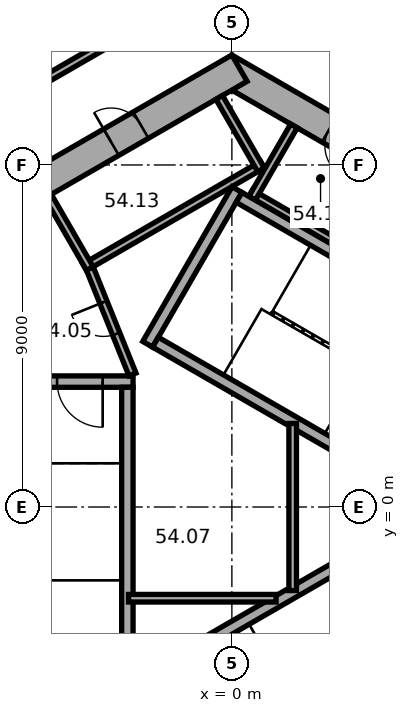
"""IFC4 building model, lengths in metres.
Left out: names, types, materials, properties, quantities, classifications, styles, units other than length and angle.
Written with IfcOpenShell. Run it as: python <this file> out.ifc"""

import sys

from ifc_helpers import new_model, si_unit, direction, frame, frame_2d, origin, place, context, subcontext, project, spatial, rectangle, extrude, element, fill, save


model = new_model("IFC4")
c1 = context("Model", 3, precision=1e-05, world=origin(), true_north=direction((0.0, 1.0)))
c2 = subcontext(c1, "Body", "Model", "MODEL_VIEW")
j1 = project(units=[si_unit("LENGTHUNIT", "METRE"), si_unit("PLANEANGLEUNIT", "RADIAN")], contexts=[c1])
p1 = place(None, origin())
s1 = spatial("IfcSite", under=j1, at=p1, CompositionType="ELEMENT")
p2 = place(p1, origin())
s2 = spatial("IfcBuilding", under=s1, at=p2, CompositionType="ELEMENT")
p3 = place(p2, frame((0.0, 0.0, 221.7)))
s3 = spatial("IfcBuildingStorey", under=s2, at=p3, CompositionType="ELEMENT", Elevation=221.7)
p4 = place(p3, frame((10.1, 5.6, 0.0), z_axis=(0.0, 0.0, 1.0), x_axis=(-0.866023897231, 0.500002609418, 0.0)))
e1 = element("IfcWall", 1, at=p4, inside=s3, PredefinedType="SHEAR", context=c2, shape_type="SweptSolid", body=[
    extrude(rectangle(XDim=11.894, YDim=0.8, at=frame_2d((5.947, 0.0))), origin(), (0.0, 0.0, 1.0), 3.7),
])
p5 = place(p4, frame((3.897, 0.0, 0.0)))
e2 = element("IfcOpeningElement", 2, at=p5, cuts=e1, PredefinedType="OPENING", context=c2, shape_type="SweptSolid", body=[
    extrude(rectangle(XDim=0.9, YDim=2.1, at=frame_2d((0.45, 1.05))), frame((0.0, 0.41, 0.0), z_axis=(0.0, -1.0, 0.0), x_axis=(1.0, 0.0, 0.0)), (0.0, 0.0, 1.0), 0.82),
])
p6 = place(p4, frame((7.797, 0.0, 0.0)))
e3 = element("IfcOpeningElement", 3, at=p6, cuts=e1, PredefinedType="OPENING", context=c2, shape_type="SweptSolid", body=[
    extrude(rectangle(XDim=0.9, YDim=2.1, at=frame_2d((0.45, 1.05))), frame((0.0, 0.41, 0.0), z_axis=(0.0, -1.0, 0.0), x_axis=(1.0, 0.0, 0.0)), (0.0, 0.0, 1.0), 0.82),
])
p7 = place(p3, frame((0.2, 11.547, 0.0), z_axis=(0.0, 0.0, 1.0), x_axis=(-0.866023897231, -0.500002609418, 0.0)))
e4 = element("IfcWall", 4, at=p7, inside=s3, PredefinedType="SHEAR", context=c2, shape_type="SweptSolid", body=[
    extrude(rectangle(XDim=11.894, YDim=0.8, at=frame_2d((5.947, 0.0))), origin(), (0.0, 0.0, 1.0), 3.7),
])
p8 = place(p7, frame((6.147, 0.0, 0.0)))
e5 = element("IfcOpeningElement", 5, at=p8, cuts=e4, PredefinedType="OPENING", context=c2, shape_type="SweptSolid", body=[
    extrude(rectangle(XDim=1.5, YDim=2.1, at=frame_2d((0.75, 1.05))), frame((0.0, 0.41, 0.0), z_axis=(0.0, -1.0, 0.0), x_axis=(1.0, 0.0, 0.0)), (0.0, 0.0, 1.0), 0.82),
])
p9 = place(p7, frame((2.997, 0.0, 0.0)))
e6 = element("IfcOpeningElement", 6, at=p9, cuts=e4, PredefinedType="OPENING", context=c2, shape_type="SweptSolid", body=[
    extrude(rectangle(XDim=0.9, YDim=2.1, at=frame_2d((0.45, 1.05))), frame((0.0, 0.41, 0.0), z_axis=(0.0, -1.0, 0.0), x_axis=(1.0, 0.0, 0.0)), (0.0, 0.0, 1.0), 0.82),
])
p10 = place(p3, frame((7.424, 4.259, 0.0), z_axis=(0.0, 0.0, 1.0), x_axis=(-0.866026010844, 0.49999894854, 0.0)))
e7 = element("IfcWall", 7, at=p10, inside=s3, PredefinedType="PARTITIONING", context=c2, shape_type="SweptSolid", body=[
    extrude(rectangle(XDim=8.0, YDim=0.2, at=frame_2d((4.0, 0.0))), origin(), (0.0, 0.0, 1.0), 3.42),
])
p11 = place(p3, frame((0.532, 8.122, 0.0), z_axis=(0.0, 0.0, 1.0), x_axis=(0.500077893725, 0.86598042715, 0.0)))
e8 = element("IfcWall", 8, at=p11, inside=s3, PredefinedType="PARTITIONING", context=c2, shape_type="SweptSolid", body=[
    extrude(rectangle(XDim=2.2, YDim=0.2, at=frame_2d((1.1, 0.0))), origin(), (0.0, 0.0, 1.0), 3.42),
])
p12 = place(p3, frame((0.803, 9.009, 0.0), z_axis=(0.0, 0.0, 1.0), x_axis=(-0.866028230842, -0.499995103361, 0.0)))
e9 = element("IfcWall", 9, at=p12, inside=s3, PredefinedType="PARTITIONING", context=c2, shape_type="SweptSolid", body=[
    extrude(rectangle(XDim=5.4, YDim=0.2, at=frame_2d((2.7, 0.0))), origin(), (0.0, 0.0, 1.0), 3.42),
])
p13 = place(p3, frame((0.767, 8.872, 0.0), z_axis=(0.0, 0.0, 1.0), x_axis=(-0.499994660107, 0.866028486751, 0.0)))
e10 = element("IfcWall", 10, at=p13, inside=s3, PredefinedType="PARTITIONING", context=c2, shape_type="SweptSolid", body=[
    extrude(rectangle(XDim=2.2, YDim=0.2, at=frame_2d((1.1, 0.0))), origin(), (0.0, 0.0, 1.0), 3.42),
])
p14 = place(p3, frame((-3.737, 6.272, 0.0), z_axis=(0.0, 0.0, 1.0), x_axis=(-0.50002983664, 0.866008176907, 0.0)))
e11 = element("IfcWall", 11, at=p14, inside=s3, PredefinedType="PARTITIONING", context=c2, shape_type="SweptSolid", body=[
    extrude(rectangle(XDim=2.2, YDim=0.2, at=frame_2d((1.1, 0.0))), origin(), (0.0, 0.0, 1.0), 3.42),
])
p15 = place(p3, frame((-2.216, 4.282, 0.0), z_axis=(0.0, 0.0, 1.0), x_axis=(0.499977259774, 0.866038532462, 0.0)))
e12 = element("IfcWall", 12, at=p15, inside=s3, PredefinedType="SHEAR", context=c2, shape_type="SweptSolid", body=[
    extrude(rectangle(XDim=4.7, YDim=0.3, at=frame_2d((2.35, 0.0))), origin(), (0.0, 0.0, 1.0), 3.42),
])
for number, where, z_axis, x_axis in (
    (13, (4.103, 0.807, 0.0), (0.0, 0.0, 1.0), (-0.866, 0.5, 0.0)),
    (14, (6.303, 4.617, 0.0), (0.0, 0.0, 1.0), (-0.866, 0.5, 0.0)),
):
    element("IfcWall", number, at=place(p3, frame(where, z_axis=z_axis, x_axis=x_axis)), inside=s3, PredefinedType="SHEAR", context=c2, shape_type="SweptSolid", body=[
        extrude(rectangle(XDim=7.06, YDim=0.3, at=frame_2d((3.53, 0.0))), origin(), (0.0, 0.0, 1.0), 3.42),
    ])
p16 = place(p3, frame((-2.6, 3.3, 0.0), z_axis=(0.0, 0.0, 1.0), x_axis=(-1.0, 0.0, 0.0)))
e15 = element("IfcWall", 15, at=p16, inside=s3, PredefinedType="SHEAR", context=c2, shape_type="SweptSolid", body=[
    extrude(rectangle(XDim=4.7, YDim=0.3, at=frame_2d((2.35, 0.0))), origin(), (0.0, 0.0, 1.0), 3.42),
])
p17 = place(p16, frame((0.8, 0.0, 0.0)))
e16 = element("IfcOpeningElement", 16, at=p17, cuts=e15, PredefinedType="OPENING", context=c2, shape_type="SweptSolid", body=[
    extrude(rectangle(XDim=1.2, YDim=2.1, at=frame_2d((0.6, 1.05))), frame((0.0, 0.16, 0.0), z_axis=(0.0, -1.0, 0.0), x_axis=(1.0, 0.0, 0.0)), (0.0, 0.0, 1.0), 0.32),
])
p18 = place(p3, frame((-2.75, 3.15, 0.0), z_axis=(0.0, 0.0, 1.0), x_axis=(0.0, -1.0, 0.0)))
e17 = element("IfcWall", 17, at=p18, inside=s3, PredefinedType="SHEAR", context=c2, shape_type="SweptSolid", body=[
    extrude(rectangle(XDim=7.06, YDim=0.3, at=frame_2d((3.53, 0.0))), origin(), (0.0, 0.0, 1.0), 3.42),
])
p19 = place(p3, frame((-1.353, -3.957, 0.0), z_axis=(0.0, 0.0, 1.0), x_axis=(0.866027801685, 0.499995846692, 0.0)))
e18 = element("IfcWall", 18, at=p19, inside=s3, PredefinedType="SHEAR", context=c2, shape_type="SweptSolid", body=[
    extrude(rectangle(XDim=7.06, YDim=0.3, at=frame_2d((3.53, 0.0))), origin(), (0.0, 0.0, 1.0), 3.42),
])
p20 = place(p3, frame((-2.615, 3.487, 0.0), z_axis=(0.0, 0.0, 1.0), x_axis=(-0.373576831041, 0.92759924068, 0.0)))
e19 = element("IfcWall", 19, at=p20, inside=s3, PredefinedType="PARTITIONING", context=c2, shape_type="SweptSolid", body=[
    extrude(rectangle(XDim=3.002, YDim=0.2, at=frame_2d((1.501, 0.0))), origin(), (0.0, 0.0, 1.0), 3.42),
])
p21 = place(p20, frame((1.15, 0.0, 0.0)))
e20 = element("IfcOpeningElement", 20, at=p21, cuts=e19, PredefinedType="OPENING", context=c2, shape_type="SweptSolid", body=[
    extrude(rectangle(XDim=0.9, YDim=2.1, at=frame_2d((0.45, 1.05))), frame((0.0, 0.11, 0.0), z_axis=(0.0, -1.0, 0.0), x_axis=(1.0, 0.0, 0.0)), (0.0, 0.0, 1.0), 0.22),
])
p22 = place(p3, frame((-2.72, -2.4, 0.0), z_axis=(0.0, 0.0, 1.0), x_axis=(1.0, 0.0, 0.0)))
e21 = element("IfcWall", 21, at=p22, inside=s3, PredefinedType="PARTITIONING", context=c2, shape_type="SweptSolid", body=[
    extrude(rectangle(XDim=3.883, YDim=0.2, at=frame_2d((1.941, 0.0))), origin(), (0.0, 0.0, 1.0), 3.42),
])
p23 = place(p3, frame((1.6, -2.198, 0.0), z_axis=(0.0, 0.0, 1.0), x_axis=(0.0, 1.0, 0.0)))
e22 = element("IfcWall", 22, at=p23, inside=s3, PredefinedType="PARTITIONING", context=c2, shape_type="SweptSolid", body=[
    extrude(rectangle(XDim=4.397, YDim=0.2, at=frame_2d((2.198, 0.0))), origin(), (0.0, 0.0, 1.0), 3.42),
])
p24 = place(p3, frame((-1.167, 13.414, 0.0), z_axis=(0.0, 0.0, 1.0), x_axis=(-0.866023347809, -0.500003561037, 0.0)))
e23 = element("IfcWall", 23, at=p24, inside=s3, PredefinedType="PARTITIONING", context=c2, shape_type="SweptSolid", body=[
    extrude(rectangle(XDim=4.661, YDim=0.2, at=frame_2d((2.331, 0.0))), origin(), (0.0, 0.0, 1.0), 3.42),
])
p25 = place(p3, frame((8.721, 9.052, 0.0), z_axis=(0.0, 0.0, 1.0), x_axis=(-0.866028125821, 0.499995285264, 0.0)))
e24 = element("IfcWall", 24, at=p25, inside=s3, PredefinedType="PARTITIONING", context=c2, shape_type="SweptSolid", body=[
    extrude(rectangle(XDim=8.934, YDim=0.2, at=frame_2d((4.467, 0.0))), origin(), (0.0, 0.0, 1.0), 3.42),
])
p26 = place(p25, frame((5.05, 0.0, 0.0)))
e25 = element("IfcOpeningElement", 25, at=p26, cuts=e24, PredefinedType="OPENING", context=c2, shape_type="SweptSolid", body=[
    extrude(rectangle(XDim=1.0, YDim=2.1, at=frame_2d((0.5, 1.05))), frame((0.0, 0.11, 0.0), z_axis=(0.0, -1.0, 0.0), x_axis=(1.0, 0.0, 0.0)), (0.0, 0.0, 1.0), 0.22),
])
p27 = place(p17, origin())
e26 = element("IfcDoor", 26, at=p27, inside=s3, OperationType="SINGLE_SWING_RIGHT", PredefinedType="DOOR", context=c2, shape_type="SweptSolid", body=[
    extrude(rectangle(XDim=1.2, YDim=2.1, at=frame_2d((0.6, 1.05))), frame((0.0, 0.025, 0.0), z_axis=(0.0, -1.0, 0.0), x_axis=(1.0, 0.0, 0.0)), (0.0, 0.0, 1.0), 0.05),
])
fill(e16, e26)
p28 = place(p21, origin())
e27 = element("IfcDoor", 27, at=p28, inside=s3, OperationType="SINGLE_SWING_LEFT", PredefinedType="DOOR", context=c2, shape_type="SweptSolid", body=[
    extrude(rectangle(XDim=0.9, YDim=2.1, at=frame_2d((0.45, 1.05))), frame((0.0, 0.025, 0.0), z_axis=(0.0, -1.0, 0.0), x_axis=(1.0, 0.0, 0.0)), (0.0, 0.0, 1.0), 0.05),
])
fill(e20, e27)
p29 = place(p9, origin())
e28 = element("IfcDoor", 28, at=p29, inside=s3, OperationType="SINGLE_SWING_LEFT", PredefinedType="DOOR", context=c2, shape_type="SweptSolid", body=[
    extrude(rectangle(XDim=0.9, YDim=2.1, at=frame_2d((0.45, 1.05))), frame((0.0, 0.025, 0.0), z_axis=(0.0, -1.0, 0.0), x_axis=(1.0, 0.0, 0.0)), (0.0, 0.0, 1.0), 0.05),
])
fill(e6, e28)
save(model, sys.argv[1])
